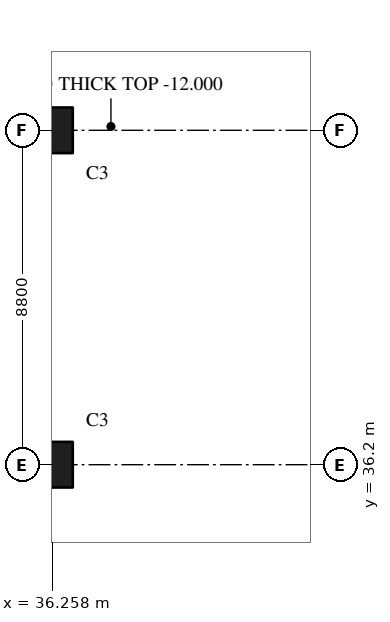
"""IFC4 building model, lengths in metres.
Left out: names, types, materials, properties, quantities, classifications, styles, units other than length and angle.
Written with IfcOpenShell. Run it as: python <this file> out.ifc"""

import sys

from ifc_helpers import new_model, si_unit, direction, frame, origin, origin_2d, place, context, subcontext, project, spatial, rectangle, extrude, element, save


model = new_model("IFC4")
c1 = context("Model", 3, precision=1e-05, world=origin(), true_north=direction((0.0, 1.0)))
c2 = subcontext(c1, "Body", "Model", "MODEL_VIEW")
j1 = project(units=[si_unit("LENGTHUNIT", "METRE"), si_unit("PLANEANGLEUNIT", "RADIAN")], contexts=[c1])
p1 = place(None, origin())
s1 = spatial("IfcSite", under=j1, at=p1, CompositionType="ELEMENT")
p2 = place(p1, origin())
s2 = spatial("IfcBuilding", under=s1, at=p2, CompositionType="ELEMENT")
p3 = place(p2, frame((0.0, 0.0, -12.0)))
s3 = spatial("IfcBuildingStorey", under=s2, at=p3, CompositionType="ELEMENT", Elevation=-12.0)
for number, where, z_axis, x_axis in (
    (1, (36.2, 36.2, 0.0), (0.0, 0.0, 1.0), (1.0, 0.0, 0.0)),
    (2, (36.2, 45.0, 0.0), (0.0, 0.0, 1.0), (1.0, 0.0, 0.0)),
):
    element("IfcColumn", number, at=place(p3, frame(where, z_axis=z_axis, x_axis=x_axis)), inside=s3, PredefinedType="COLUMN", context=c2, shape_type="SweptSolid", body=[
        extrude(rectangle(XDim=1.2, YDim=1.2, at=origin_2d()), origin(), (0.0, 0.0, 1.0), 5.0),
    ])
save(model, sys.argv[1])
